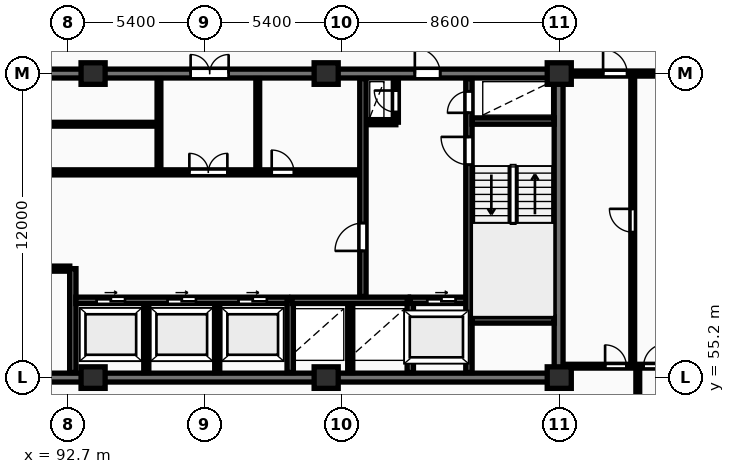
"""IFC4 building model, lengths in metres.
Left out: names, types, materials, properties, quantities, classifications, styles, units other than length and angle.
Written with IfcOpenShell. Run it as: python <this file> out.ifc"""

import sys

from ifc_helpers import new_model, si_unit, direction, frame, frame_2d, origin, origin_2d, place, context, subcontext, project, spatial, rectangle, extrude, element, fill, save


model = new_model("IFC4")
c1 = context("Model", 3, precision=1e-05, world=origin(), true_north=direction((0.0, 1.0)))
c2 = subcontext(c1, "Body", "Model", "MODEL_VIEW")
j1 = project(units=[si_unit("LENGTHUNIT", "METRE"), si_unit("PLANEANGLEUNIT", "RADIAN")], contexts=[c1])
p1 = place(None, origin())
s1 = spatial("IfcSite", under=j1, at=p1, CompositionType="ELEMENT")
p2 = place(p1, origin())
s2 = spatial("IfcBuilding", under=s1, at=p2, CompositionType="ELEMENT")
p3 = place(p2, frame((0.0, 0.0, 113.3)))
s3 = spatial("IfcBuildingStorey", under=s2, at=p3, CompositionType="ELEMENT", Elevation=113.3)
for number, where, z_axis, x_axis in (
    (1, (93.7, 55.2, 0.0), (0.0, 0.0, 1.0), (1.0, 0.0, 0.0)),
    (2, (93.7, 67.2, 0.0), (0.0, 0.0, 1.0), (1.0, 0.0, 0.0)),
    (3, (102.9, 55.2, 0.0), (0.0, 0.0, 1.0), (1.0, 0.0, 0.0)),
    (4, (102.9, 67.2, 0.0), (0.0, 0.0, 1.0), (1.0, 0.0, 0.0)),
    (5, (112.1, 55.2, 0.0), (0.0, 0.0, 1.0), (1.0, 0.0, 0.0)),
    (6, (112.1, 67.2, 0.0), (0.0, 0.0, 1.0), (1.0, 0.0, 0.0)),
):
    element("IfcColumn", number, at=place(p3, frame(where, z_axis=z_axis, x_axis=x_axis)), inside=s3, PredefinedType="COLUMN", context=c2, shape_type="SweptSolid", body=[
        extrude(rectangle(XDim=0.95, YDim=0.85, at=origin_2d()), origin(), (0.0, 0.0, 1.0), 3.25),
    ])
p4 = place(p3, frame((75.95, 55.2, 0.0), z_axis=(0.0, 0.0, 1.0), x_axis=(1.0, 0.0, 0.0)))
e7 = element("IfcWall", 7, at=p4, inside=s3, PredefinedType="SHEAR", context=c2, shape_type="SweptSolid", body=[
    extrude(rectangle(XDim=36.3, YDim=0.35, at=frame_2d((18.15, 0.0))), origin(), (0.0, 0.0, 1.0), 3.25),
])
p5 = place(p3, frame((112.075, 55.375, 0.0), z_axis=(0.0, 0.0, 1.0), x_axis=(0.0, 1.0, 0.0)))
e8 = element("IfcWall", 8, at=p5, inside=s3, PredefinedType="SHEAR", context=c2, shape_type="SweptSolid", body=[
    extrude(rectangle(XDim=11.65, YDim=0.35, at=frame_2d((5.825, 0.0))), origin(), (0.0, 0.0, 1.0), 3.25),
])
p6 = place(p3, frame((75.95, 67.2, 0.0), z_axis=(0.0, 0.0, 1.0), x_axis=(1.0, 0.0, 0.0)))
e9 = element("IfcWall", 9, at=p6, inside=s3, PredefinedType="SHEAR", context=c2, shape_type="SweptSolid", body=[
    extrude(rectangle(XDim=36.3, YDim=0.35, at=frame_2d((18.15, 0.0))), origin(), (0.0, 0.0, 1.0), 3.25),
])
p7 = place(p6, frame((5.25, 0.0, 0.0)))
e10 = element("IfcOpeningElement", 10, at=p7, cuts=e9, PredefinedType="OPENING", context=c2, shape_type="SweptSolid", body=[
    extrude(rectangle(XDim=1.0, YDim=2.15, at=frame_2d((0.5, 1.075))), frame((0.0, 0.185, 0.0), z_axis=(0.0, -1.0, 0.0), x_axis=(1.0, 0.0, 0.0)), (0.0, 0.0, 1.0), 0.37),
])
p8 = place(p6, frame((21.6, 0.0, 0.0)))
e11 = element("IfcOpeningElement", 11, at=p8, cuts=e9, PredefinedType="OPENING", context=c2, shape_type="SweptSolid", body=[
    extrude(rectangle(XDim=1.5, YDim=2.2, at=frame_2d((0.75, 1.1))), frame((0.0, 0.185, 0.0), z_axis=(0.0, -1.0, 0.0), x_axis=(1.0, 0.0, 0.0)), (0.0, 0.0, 1.0), 0.37),
])
p9 = place(p6, frame((30.45, 0.0, 0.0)))
e12 = element("IfcOpeningElement", 12, at=p9, cuts=e9, PredefinedType="OPENING", context=c2, shape_type="SweptSolid", body=[
    extrude(rectangle(XDim=1.0, YDim=2.15, at=frame_2d((0.5, 1.075))), frame((0.0, 0.185, 0.0), z_axis=(0.0, -1.0, 0.0), x_axis=(1.0, 0.0, 0.0)), (0.0, 0.0, 1.0), 0.37),
])
p10 = place(p3, frame((84.42, 59.5, 0.0), z_axis=(0.0, 0.0, 1.0), x_axis=(1.0, 0.0, 0.0)))
e13 = element("IfcWall", 13, at=p10, inside=s3, PredefinedType="PARTITIONING", context=c2, shape_type="SweptSolid", body=[
    extrude(rectangle(XDim=8.36, YDim=0.2, at=frame_2d((4.18, 0.0))), origin(), (0.0, 0.0, 1.0), 2.97),
])
p11 = place(p10, frame((3.4, 0.0, 0.0)))
e14 = element("IfcOpeningElement", 14, at=p11, cuts=e13, PredefinedType="OPENING", context=c2, shape_type="SweptSolid", body=[
    extrude(rectangle(XDim=0.92, YDim=2.08, at=frame_2d((0.46, 1.04))), frame((0.0, 0.11, 0.0), z_axis=(0.0, -1.0, 0.0), x_axis=(1.0, 0.0, 0.0)), (0.0, 0.0, 1.0), 0.22),
])
p12 = place(p3, frame((92.9, 55.4, 0.0), z_axis=(0.0, 0.0, 1.0), x_axis=(0.0, 1.0, 0.0)))
e15 = element("IfcWall", 15, at=p12, inside=s3, PredefinedType="SHEAR", context=c2, shape_type="SweptSolid", body=[
    extrude(rectangle(XDim=4.1, YDim=0.25, at=frame_2d((2.05, 0.0))), origin(), (0.0, 0.0, 1.0), 3.25),
])
for number, where, z_axis, x_axis in (
    (16, (95.8, 55.4, 0.0), (0.0, 0.0, 1.0), (0.0, 1.0, 0.0)),
    (17, (98.6, 55.4, 0.0), (0.0, 0.0, 1.0), (0.0, 1.0, 0.0)),
):
    element("IfcWall", number, at=place(p3, frame(where, z_axis=z_axis, x_axis=x_axis)), inside=s3, PredefinedType="PARTITIONING", context=c2, shape_type="SweptSolid", body=[
        extrude(rectangle(XDim=2.72, YDim=0.2, at=frame_2d((1.36, 0.0))), origin(), (0.0, 0.0, 1.0), 2.97),
    ])
p13 = place(p3, frame((93.02, 58.25, 0.0), z_axis=(0.0, 0.0, 1.0), x_axis=(1.0, 0.0, 0.0)))
e18 = element("IfcWall", 18, at=p13, inside=s3, PredefinedType="SHEAR", context=c2, shape_type="SweptSolid", body=[
    extrude(rectangle(XDim=8.36, YDim=0.25, at=frame_2d((4.18, 0.0))), origin(), (0.0, 0.0, 1.0), 3.25),
])
p14 = place(p13, frame((0.82, 0.0, 0.0)))
e19 = element("IfcOpeningElement", 19, at=p14, cuts=e18, PredefinedType="OPENING", context=c2, shape_type="SweptSolid", body=[
    extrude(rectangle(XDim=1.12, YDim=2.12, at=frame_2d((0.56, 1.06))), frame((0.0, 0.135, 0.0), z_axis=(0.0, -1.0, 0.0), x_axis=(1.0, 0.0, 0.0)), (0.0, 0.0, 1.0), 0.27),
])
p15 = place(p13, frame((3.62, 0.0, 0.0)))
e20 = element("IfcOpeningElement", 20, at=p15, cuts=e18, PredefinedType="OPENING", context=c2, shape_type="SweptSolid", body=[
    extrude(rectangle(XDim=1.12, YDim=2.12, at=frame_2d((0.56, 1.06))), frame((0.0, 0.135, 0.0), z_axis=(0.0, -1.0, 0.0), x_axis=(1.0, 0.0, 0.0)), (0.0, 0.0, 1.0), 0.27),
])
p16 = place(p13, frame((6.42, 0.0, 0.0)))
e21 = element("IfcOpeningElement", 21, at=p16, cuts=e18, PredefinedType="OPENING", context=c2, shape_type="SweptSolid", body=[
    extrude(rectangle(XDim=1.12, YDim=2.12, at=frame_2d((0.56, 1.06))), frame((0.0, 0.135, 0.0), z_axis=(0.0, -1.0, 0.0), x_axis=(1.0, 0.0, 0.0)), (0.0, 0.0, 1.0), 0.27),
])
p17 = place(p3, frame((101.48, 55.4, 0.0), z_axis=(0.0, 0.0, 1.0), x_axis=(0.0, 1.0, 0.0)))
e22 = element("IfcWall", 22, at=p17, inside=s3, PredefinedType="SHEAR", context=c2, shape_type="SweptSolid", body=[
    extrude(rectangle(XDim=2.85, YDim=0.25, at=frame_2d((1.425, 0.0))), origin(), (0.0, 0.0, 1.0), 3.25),
])
p18 = place(p3, frame((103.85, 55.4, 0.0), z_axis=(0.0, 0.0, 1.0), x_axis=(0.0, 1.0, 0.0)))
e23 = element("IfcWall", 23, at=p18, inside=s3, PredefinedType="PARTITIONING", context=c2, shape_type="SweptSolid", body=[
    extrude(rectangle(XDim=2.72, YDim=0.2, at=frame_2d((1.36, 0.0))), origin(), (0.0, 0.0, 1.0), 2.97),
])
p19 = place(p3, frame((101.55, 58.25, 0.0), z_axis=(0.0, 0.0, 1.0), x_axis=(1.0, 0.0, 0.0)))
e24 = element("IfcWall", 24, at=p19, inside=s3, PredefinedType="SHEAR", context=c2, shape_type="SweptSolid", body=[
    extrude(rectangle(XDim=4.6, YDim=0.25, at=frame_2d((2.3, 0.0))), origin(), (0.0, 0.0, 1.0), 3.25),
])
p20 = place(p3, frame((106.22, 55.4, 0.0), z_axis=(0.0, 0.0, 1.0), x_axis=(0.0, 1.0, 0.0)))
e25 = element("IfcWall", 25, at=p20, inside=s3, PredefinedType="SHEAR", context=c2, shape_type="SweptSolid", body=[
    extrude(rectangle(XDim=2.85, YDim=0.25, at=frame_2d((1.425, 0.0))), origin(), (0.0, 0.0, 1.0), 3.25),
])
p21 = place(p3, frame((106.22, 58.25, 0.0), z_axis=(0.0, 0.0, 1.0), x_axis=(1.0, 0.0, 0.0)))
e26 = element("IfcWall", 26, at=p21, inside=s3, PredefinedType="SHEAR", context=c2, shape_type="SweptSolid", body=[
    extrude(rectangle(XDim=2.46, YDim=0.25, at=frame_2d((1.23, 0.0))), origin(), (0.0, 0.0, 1.0), 3.25),
])
p22 = place(p21, frame((0.67, 0.0, 0.0)))
e27 = element("IfcOpeningElement", 27, at=p22, cuts=e26, PredefinedType="OPENING", context=c2, shape_type="SweptSolid", body=[
    extrude(rectangle(XDim=1.12, YDim=2.12, at=frame_2d((0.56, 1.06))), frame((0.0, 0.135, 0.0), z_axis=(0.0, -1.0, 0.0), x_axis=(1.0, 0.0, 0.0)), (0.0, 0.0, 1.0), 0.27),
])
p23 = place(p3, frame((89.25, 65.2, 0.0), z_axis=(0.0, 0.0, 1.0), x_axis=(1.0, 0.0, 0.0)))
e28 = element("IfcWall", 28, at=p23, inside=s3, PredefinedType="PARTITIONING", context=c2, shape_type="SweptSolid", body=[
    extrude(rectangle(XDim=7.05, YDim=0.15, at=frame_2d((3.525, 0.0))), origin(), (0.0, 0.0, 1.0), 2.97),
])
p24 = place(p23, frame((1.6, 0.0, 0.0)))
e29 = element("IfcOpeningElement", 29, at=p24, cuts=e28, PredefinedType="OPENING", context=c2, shape_type="SweptSolid", body=[
    extrude(rectangle(XDim=0.88, YDim=2.06, at=frame_2d((0.44, 1.03))), frame((0.0, 0.085, 0.0), z_axis=(0.0, -1.0, 0.0), x_axis=(1.0, 0.0, 0.0)), (0.0, 0.0, 1.0), 0.17),
])
for number, where, z_axis, x_axis in (
    (30, (96.3, 63.4, 0.0), (0.0, 0.0, 1.0), (0.0, 1.0, 0.0)),
    (31, (100.2, 63.4, 0.0), (0.0, 0.0, 1.0), (0.0, 1.0, 0.0)),
):
    element("IfcWall", number, at=place(p3, frame(where, z_axis=z_axis, x_axis=x_axis)), inside=s3, PredefinedType="PARTITIONING", context=c2, shape_type="SweptSolid", body=[
        extrude(rectangle(XDim=3.6, YDim=0.15, at=frame_2d((1.8, 0.0))), origin(), (0.0, 0.0, 1.0), 2.97),
    ])
p25 = place(p3, frame((84.42, 63.3, 0.0), z_axis=(0.0, 0.0, 1.0), x_axis=(1.0, 0.0, 0.0)))
e32 = element("IfcWall", 32, at=p25, inside=s3, PredefinedType="PARTITIONING", context=c2, shape_type="SweptSolid", body=[
    extrude(rectangle(XDim=19.83, YDim=0.2, at=frame_2d((9.915, 0.0))), origin(), (0.0, 0.0, 1.0), 2.97),
])
p26 = place(p25, frame((1.15, 0.0, 0.0)))
e33 = element("IfcOpeningElement", 33, at=p26, cuts=e32, PredefinedType="OPENING", context=c2, shape_type="SweptSolid", body=[
    extrude(rectangle(XDim=0.85, YDim=2.05, at=frame_2d((0.425, 1.025))), frame((0.0, 0.11, 0.0), z_axis=(0.0, -1.0, 0.0), x_axis=(1.0, 0.0, 0.0)), (0.0, 0.0, 1.0), 0.22),
])
p27 = place(p25, frame((3.25, 0.0, 0.0)))
e34 = element("IfcOpeningElement", 34, at=p27, cuts=e32, PredefinedType="OPENING", context=c2, shape_type="SweptSolid", body=[
    extrude(rectangle(XDim=0.85, YDim=2.05, at=frame_2d((0.425, 1.025))), frame((0.0, 0.11, 0.0), z_axis=(0.0, -1.0, 0.0), x_axis=(1.0, 0.0, 0.0)), (0.0, 0.0, 1.0), 0.22),
])
p28 = place(p25, frame((13.08, 0.0, 0.0)))
e35 = element("IfcOpeningElement", 35, at=p28, cuts=e32, PredefinedType="OPENING", context=c2, shape_type="SweptSolid", body=[
    extrude(rectangle(XDim=1.5, YDim=2.2, at=frame_2d((0.75, 1.1))), frame((0.0, 0.11, 0.0), z_axis=(0.0, -1.0, 0.0), x_axis=(1.0, 0.0, 0.0)), (0.0, 0.0, 1.0), 0.22),
])
p29 = place(p25, frame((6.68, 0.0, 0.0)))
e36 = element("IfcOpeningElement", 36, at=p29, cuts=e32, PredefinedType="OPENING", context=c2, shape_type="SweptSolid", body=[
    extrude(rectangle(XDim=0.92, YDim=2.08, at=frame_2d((0.46, 1.04))), frame((0.0, 0.11, 0.0), z_axis=(0.0, -1.0, 0.0), x_axis=(1.0, 0.0, 0.0)), (0.0, 0.0, 1.0), 0.22),
])
p30 = place(p25, frame((16.33, 0.0, 0.0)))
e37 = element("IfcOpeningElement", 37, at=p30, cuts=e32, PredefinedType="OPENING", context=c2, shape_type="SweptSolid", body=[
    extrude(rectangle(XDim=0.88, YDim=2.06, at=frame_2d((0.44, 1.03))), frame((0.0, 0.11, 0.0), z_axis=(0.0, -1.0, 0.0), x_axis=(1.0, 0.0, 0.0)), (0.0, 0.0, 1.0), 0.22),
])
p31 = place(p3, frame((104.45, 65.28, 0.0), z_axis=(0.0, 0.0, 1.0), x_axis=(1.0, 0.0, 0.0)))
e38 = element("IfcWall", 38, at=p31, inside=s3, PredefinedType="PARTITIONING", context=c2, shape_type="SweptSolid", body=[
    extrude(rectangle(XDim=1.2, YDim=0.2, at=frame_2d((0.6, 0.0))), origin(), (0.0, 0.0, 1.0), 2.97),
])
p32 = place(p3, frame((105.65, 65.28, 0.0), z_axis=(0.0, 0.0, 1.0), x_axis=(0.0, 1.0, 0.0)))
e39 = element("IfcWall", 39, at=p32, inside=s3, PredefinedType="PARTITIONING", context=c2, shape_type="SweptSolid", body=[
    extrude(rectangle(XDim=1.72, YDim=0.2, at=frame_2d((0.86, 0.0))), origin(), (0.0, 0.0, 1.0), 2.97),
])
p33 = place(p32, frame((0.4, 0.0, 0.0)))
e40 = element("IfcOpeningElement", 40, at=p33, cuts=e39, PredefinedType="OPENING", context=c2, shape_type="SweptSolid", body=[
    extrude(rectangle(XDim=0.85, YDim=2.05, at=frame_2d((0.425, 1.025))), frame((0.0, 0.11, 0.0), z_axis=(0.0, -1.0, 0.0), x_axis=(1.0, 0.0, 0.0)), (0.0, 0.0, 1.0), 0.22),
])
p34 = place(p3, frame((104.35, 58.4, 0.0), z_axis=(0.0, 0.0, 1.0), x_axis=(0.0, 1.0, 0.0)))
e41 = element("IfcWall", 41, at=p34, inside=s3, PredefinedType="SHEAR", context=c2, shape_type="SweptSolid", body=[
    extrude(rectangle(XDim=8.6, YDim=0.25, at=frame_2d((4.3, 0.0))), origin(), (0.0, 0.0, 1.0), 3.25),
])
p35 = place(p34, frame((1.8, 0.0, 0.0)))
e42 = element("IfcOpeningElement", 42, at=p35, cuts=e41, PredefinedType="OPENING", context=c2, shape_type="SweptSolid", body=[
    extrude(rectangle(XDim=1.1, YDim=2.1, at=frame_2d((0.55, 1.05))), frame((0.0, 0.135, 0.0), z_axis=(0.0, -1.0, 0.0), x_axis=(1.0, 0.0, 0.0)), (0.0, 0.0, 1.0), 0.27),
])
p36 = place(p3, frame((108.535, 55.4, 0.0), z_axis=(0.0, 0.0, 1.0), x_axis=(0.0, 1.0, 0.0)))
e43 = element("IfcWall", 43, at=p36, inside=s3, PredefinedType="SHEAR", context=c2, shape_type="SweptSolid", body=[
    extrude(rectangle(XDim=11.6, YDim=0.25, at=frame_2d((5.8, 0.0))), origin(), (0.0, 0.0, 1.0), 3.25),
])
p37 = place(p36, frame((8.2, 0.0, 0.0)))
e44 = element("IfcOpeningElement", 44, at=p37, cuts=e43, PredefinedType="OPENING", context=c2, shape_type="SweptSolid", body=[
    extrude(rectangle(XDim=1.1, YDim=2.1, at=frame_2d((0.55, 1.05))), frame((0.0, 0.135, 0.0), z_axis=(0.0, -1.0, 0.0), x_axis=(1.0, 0.0, 0.0)), (0.0, 0.0, 1.0), 0.27),
])
p38 = place(p36, frame((10.25, 0.0, 0.0)))
e45 = element("IfcOpeningElement", 45, at=p38, cuts=e43, PredefinedType="OPENING", context=c2, shape_type="SweptSolid", body=[
    extrude(rectangle(XDim=0.85, YDim=2.05, at=frame_2d((0.425, 1.025))), frame((0.0, 0.135, 0.0), z_axis=(0.0, -1.0, 0.0), x_axis=(1.0, 0.0, 0.0)), (0.0, 0.0, 1.0), 0.27),
])
for number, where, z_axis, x_axis in (
    (46, (108.66, 57.475, 0.0), (0.0, 0.0, 1.0), (1.0, 0.0, 0.0)),
    (47, (108.66, 65.325, 0.0), (0.0, 0.0, 1.0), (1.0, 0.0, 0.0)),
):
    element("IfcWall", number, at=place(p3, frame(where, z_axis=z_axis, x_axis=x_axis)), inside=s3, PredefinedType="SHEAR", context=c2, shape_type="SweptSolid", body=[
        extrude(rectangle(XDim=3.24, YDim=0.25, at=frame_2d((1.62, 0.0))), origin(), (0.0, 0.0, 1.0), 3.25),
    ])
p39 = place(p3, frame((115.0, 55.65, 0.0), z_axis=(0.0, 0.0, 1.0), x_axis=(0.0, 1.0, 0.0)))
e48 = element("IfcWall", 48, at=p39, inside=s3, PredefinedType="PARTITIONING", context=c2, shape_type="SweptSolid", body=[
    extrude(rectangle(XDim=11.5, YDim=0.15, at=frame_2d((5.75, 0.0))), origin(), (0.0, 0.0, 1.0), 2.97),
])
p40 = place(p39, frame((5.29, 0.0, 0.0)))
e49 = element("IfcOpeningElement", 49, at=p40, cuts=e48, PredefinedType="OPENING", context=c2, shape_type="SweptSolid", body=[
    extrude(rectangle(XDim=0.92, YDim=2.08, at=frame_2d((0.46, 1.04))), frame((0.0, 0.085, 0.0), z_axis=(0.0, -1.0, 0.0), x_axis=(1.0, 0.0, 0.0)), (0.0, 0.0, 1.0), 0.17),
])
p41 = place(p3, frame((115.2, 51.1, 0.0), z_axis=(0.0, 0.0, 1.0), x_axis=(0.0, 1.0, 0.0)))
e50 = element("IfcWall", 50, at=p41, inside=s3, PredefinedType="PARTITIONING", context=c2, shape_type="SweptSolid", body=[
    extrude(rectangle(XDim=4.55, YDim=0.15, at=frame_2d((2.275, 0.0))), origin(), (0.0, 0.0, 1.0), 2.97),
])
p42 = place(p3, frame((112.27, 55.65, 0.0), z_axis=(0.0, 0.0, 1.0), x_axis=(1.0, 0.0, 0.0)))
e51 = element("IfcWall", 51, at=p42, inside=s3, PredefinedType="PARTITIONING", context=c2, shape_type="SweptSolid", body=[
    extrude(rectangle(XDim=6.76, YDim=0.15, at=frame_2d((3.38, 0.0))), origin(), (0.0, 0.0, 1.0), 2.97),
])
p43 = place(p42, frame((1.64, 0.0, 0.0)))
e52 = element("IfcOpeningElement", 52, at=p43, cuts=e51, PredefinedType="OPENING", context=c2, shape_type="SweptSolid", body=[
    extrude(rectangle(XDim=0.84, YDim=2.04, at=frame_2d((0.42, 1.02))), frame((0.0, 0.085, 0.0), z_axis=(0.0, -1.0, 0.0), x_axis=(1.0, 0.0, 0.0)), (0.0, 0.0, 1.0), 0.17),
])
p44 = place(p42, frame((3.16, 0.0, 0.0)))
e53 = element("IfcOpeningElement", 53, at=p44, cuts=e51, PredefinedType="OPENING", context=c2, shape_type="SweptSolid", body=[
    extrude(rectangle(XDim=0.88, YDim=2.06, at=frame_2d((0.44, 1.03))), frame((0.0, 0.085, 0.0), z_axis=(0.0, -1.0, 0.0), x_axis=(1.0, 0.0, 0.0)), (0.0, 0.0, 1.0), 0.17),
])
p45 = place(p3, frame((112.25, 67.2, 0.0), z_axis=(0.0, 0.0, 1.0), x_axis=(1.0, 0.0, 0.0)))
e54 = element("IfcWall", 54, at=p45, inside=s3, PredefinedType="PARTITIONING", context=c2, shape_type="SweptSolid", body=[
    extrude(rectangle(XDim=18.35, YDim=0.2, at=frame_2d((9.175, 0.0))), origin(), (0.0, 0.0, 1.0), 2.433),
])
p46 = place(p45, frame((1.58, 0.0, 0.0)))
e55 = element("IfcOpeningElement", 55, at=p46, cuts=e54, PredefinedType="OPENING", context=c2, shape_type="SweptSolid", body=[
    extrude(rectangle(XDim=0.95, YDim=2.15, at=frame_2d((0.475, 1.075))), frame((0.0, 0.11, 0.0), z_axis=(0.0, -1.0, 0.0), x_axis=(1.0, 0.0, 0.0)), (0.0, 0.0, 1.0), 0.22),
])
p47 = place(p8, origin())
e56 = element("IfcDoor", 56, at=p47, inside=s3, OperationType="DOUBLE_DOOR_SINGLE_SWING", PredefinedType="DOOR", context=c2, shape_type="SweptSolid", body=[
    extrude(rectangle(XDim=1.5, YDim=2.2, at=frame_2d((0.75, 1.1))), frame((0.0, 0.025, 0.0), z_axis=(0.0, -1.0, 0.0), x_axis=(1.0, 0.0, 0.0)), (0.0, 0.0, 1.0), 0.05),
])
fill(e11, e56)
p48 = place(p9, origin())
e57 = element("IfcDoor", 57, at=p48, inside=s3, OperationType="SINGLE_SWING_LEFT", PredefinedType="DOOR", context=c2, shape_type="SweptSolid", body=[
    extrude(rectangle(XDim=1.0, YDim=2.15, at=frame_2d((0.5, 1.075))), frame((0.0, 0.025, 0.0), z_axis=(0.0, -1.0, 0.0), x_axis=(1.0, 0.0, 0.0)), (0.0, 0.0, 1.0), 0.05),
])
fill(e12, e57)
p49 = place(p14, origin())
e58 = element("IfcDoor", 58, at=p49, inside=s3, OperationType="SLIDING_TO_RIGHT", PredefinedType="DOOR", context=c2, shape_type="SweptSolid", body=[
    extrude(rectangle(XDim=1.12, YDim=2.12, at=frame_2d((0.56, 1.06))), frame((0.0, 0.025, 0.0), z_axis=(0.0, -1.0, 0.0), x_axis=(1.0, 0.0, 0.0)), (0.0, 0.0, 1.0), 0.05),
])
fill(e19, e58)
p50 = place(p15, origin())
e59 = element("IfcDoor", 59, at=p50, inside=s3, OperationType="SLIDING_TO_RIGHT", PredefinedType="DOOR", context=c2, shape_type="SweptSolid", body=[
    extrude(rectangle(XDim=1.12, YDim=2.12, at=frame_2d((0.56, 1.06))), frame((0.0, 0.025, 0.0), z_axis=(0.0, -1.0, 0.0), x_axis=(1.0, 0.0, 0.0)), (0.0, 0.0, 1.0), 0.05),
])
fill(e20, e59)
p51 = place(p16, origin())
e60 = element("IfcDoor", 60, at=p51, inside=s3, OperationType="SLIDING_TO_RIGHT", PredefinedType="DOOR", context=c2, shape_type="SweptSolid", body=[
    extrude(rectangle(XDim=1.12, YDim=2.12, at=frame_2d((0.56, 1.06))), frame((0.0, 0.025, 0.0), z_axis=(0.0, -1.0, 0.0), x_axis=(1.0, 0.0, 0.0)), (0.0, 0.0, 1.0), 0.05),
])
fill(e21, e60)
p52 = place(p22, origin())
e61 = element("IfcDoor", 61, at=p52, inside=s3, OperationType="SLIDING_TO_RIGHT", PredefinedType="DOOR", context=c2, shape_type="SweptSolid", body=[
    extrude(rectangle(XDim=1.12, YDim=2.12, at=frame_2d((0.56, 1.06))), frame((0.0, 0.025, 0.0), z_axis=(0.0, -1.0, 0.0), x_axis=(1.0, 0.0, 0.0)), (0.0, 0.0, 1.0), 0.05),
])
fill(e27, e61)
p53 = place(p28, origin())
e62 = element("IfcDoor", 62, at=p53, inside=s3, OperationType="DOUBLE_DOOR_SINGLE_SWING", PredefinedType="DOOR", context=c2, shape_type="SweptSolid", body=[
    extrude(rectangle(XDim=1.5, YDim=2.2, at=frame_2d((0.75, 1.1))), frame((0.0, 0.025, 0.0), z_axis=(0.0, -1.0, 0.0), x_axis=(1.0, 0.0, 0.0)), (0.0, 0.0, 1.0), 0.05),
])
fill(e35, e62)
p54 = place(p30, origin())
e63 = element("IfcDoor", 63, at=p54, inside=s3, OperationType="SINGLE_SWING_LEFT", PredefinedType="DOOR", context=c2, shape_type="SweptSolid", body=[
    extrude(rectangle(XDim=0.88, YDim=2.06, at=frame_2d((0.44, 1.03))), frame((0.0, 0.025, 0.0), z_axis=(0.0, -1.0, 0.0), x_axis=(1.0, 0.0, 0.0)), (0.0, 0.0, 1.0), 0.05),
])
fill(e37, e63)
p55 = place(p33, origin())
e64 = element("IfcDoor", 64, at=p55, inside=s3, OperationType="SINGLE_SWING_RIGHT", PredefinedType="DOOR", context=c2, shape_type="SweptSolid", body=[
    extrude(rectangle(XDim=0.85, YDim=2.05, at=frame_2d((0.425, 1.025))), frame((0.0, 0.025, 0.0), z_axis=(0.0, -1.0, 0.0), x_axis=(1.0, 0.0, 0.0)), (0.0, 0.0, 1.0), 0.05),
])
fill(e40, e64)
p56 = place(p35, origin())
e65 = element("IfcDoor", 65, at=p56, inside=s3, OperationType="SINGLE_SWING_LEFT", PredefinedType="DOOR", context=c2, shape_type="SweptSolid", body=[
    extrude(rectangle(XDim=1.1, YDim=2.1, at=frame_2d((0.55, 1.05))), frame((0.0, 0.025, 0.0), z_axis=(0.0, -1.0, 0.0), x_axis=(1.0, 0.0, 0.0)), (0.0, 0.0, 1.0), 0.05),
])
fill(e42, e65)
p57 = place(p37, origin())
e66 = element("IfcDoor", 66, at=p57, inside=s3, OperationType="SINGLE_SWING_RIGHT", PredefinedType="DOOR", context=c2, shape_type="SweptSolid", body=[
    extrude(rectangle(XDim=1.1, YDim=2.1, at=frame_2d((0.55, 1.05))), frame((0.0, 0.025, 0.0), z_axis=(0.0, -1.0, 0.0), x_axis=(1.0, 0.0, 0.0)), (0.0, 0.0, 1.0), 0.05),
])
fill(e44, e66)
p58 = place(p38, origin())
e67 = element("IfcDoor", 67, at=p58, inside=s3, OperationType="SINGLE_SWING_LEFT", PredefinedType="DOOR", context=c2, shape_type="SweptSolid", body=[
    extrude(rectangle(XDim=0.85, YDim=2.05, at=frame_2d((0.425, 1.025))), frame((0.0, 0.025, 0.0), z_axis=(0.0, -1.0, 0.0), x_axis=(1.0, 0.0, 0.0)), (0.0, 0.0, 1.0), 0.05),
])
fill(e45, e67)
p59 = place(p40, origin())
e68 = element("IfcDoor", 68, at=p59, inside=s3, OperationType="SINGLE_SWING_RIGHT", PredefinedType="DOOR", context=c2, shape_type="SweptSolid", body=[
    extrude(rectangle(XDim=0.92, YDim=2.08, at=frame_2d((0.46, 1.04))), frame((0.0, 0.025, 0.0), z_axis=(0.0, -1.0, 0.0), x_axis=(1.0, 0.0, 0.0)), (0.0, 0.0, 1.0), 0.05),
])
fill(e49, e68)
p60 = place(p43, origin())
e69 = element("IfcDoor", 69, at=p60, inside=s3, OperationType="SINGLE_SWING_LEFT", PredefinedType="DOOR", context=c2, shape_type="SweptSolid", body=[
    extrude(rectangle(XDim=0.84, YDim=2.04, at=frame_2d((0.42, 1.02))), frame((0.0, 0.025, 0.0), z_axis=(0.0, -1.0, 0.0), x_axis=(1.0, 0.0, 0.0)), (0.0, 0.0, 1.0), 0.05),
])
fill(e52, e69)
p61 = place(p44, origin())
e70 = element("IfcDoor", 70, at=p61, inside=s3, OperationType="SINGLE_SWING_RIGHT", PredefinedType="DOOR", context=c2, shape_type="SweptSolid", body=[
    extrude(rectangle(XDim=0.88, YDim=2.06, at=frame_2d((0.44, 1.03))), frame((0.0, 0.025, 0.0), z_axis=(0.0, -1.0, 0.0), x_axis=(1.0, 0.0, 0.0)), (0.0, 0.0, 1.0), 0.05),
])
fill(e53, e70)
p62 = place(p46, origin())
e71 = element("IfcDoor", 71, at=p62, inside=s3, OperationType="SINGLE_SWING_LEFT", PredefinedType="DOOR", context=c2, shape_type="SweptSolid", body=[
    extrude(rectangle(XDim=0.95, YDim=2.15, at=frame_2d((0.475, 1.075))), frame((0.0, 0.025, 0.0), z_axis=(0.0, -1.0, 0.0), x_axis=(1.0, 0.0, 0.0)), (0.0, 0.0, 1.0), 0.05),
])
fill(e55, e71)
save(model, sys.argv[1])
